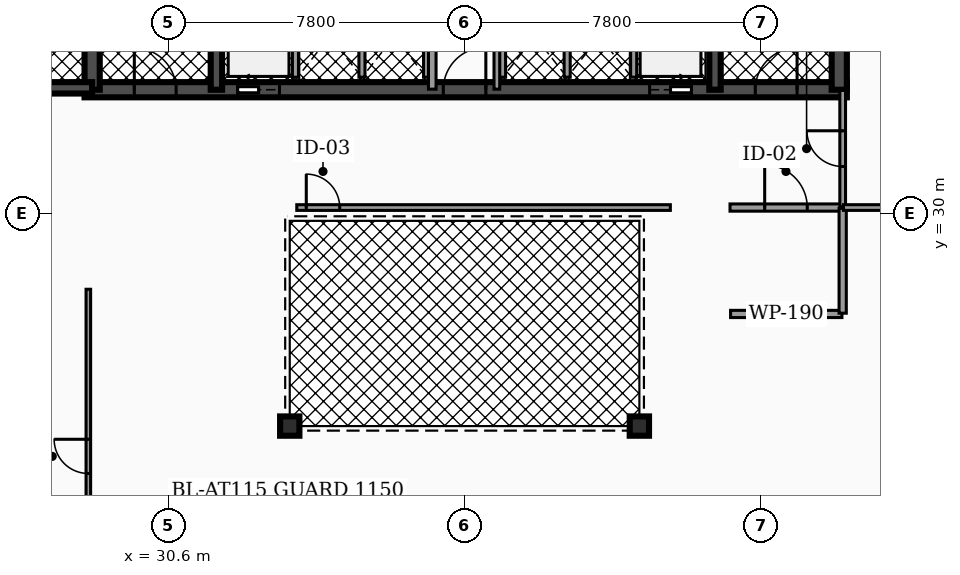
"""IFC4 building model, lengths in metres.
Left out: names, types, materials, properties, quantities, classifications, styles, units other than length and angle.
Written with IfcOpenShell. Run it as: python <this file> out.ifc"""

import sys

from ifc_helpers import new_model, si_unit, direction, frame, frame_2d, origin, origin_2d, place, context, subcontext, project, spatial, rectangle, hollow_circle, extrude, element, fill, save


model = new_model("IFC4")
c1 = context("Model", 3, precision=1e-05, world=origin(), true_north=direction((0.0, 1.0)))
c2 = subcontext(c1, "Body", "Model", "MODEL_VIEW")
j1 = project(units=[si_unit("LENGTHUNIT", "METRE"), si_unit("PLANEANGLEUNIT", "RADIAN")], contexts=[c1])
p1 = place(None, origin())
s1 = spatial("IfcSite", under=j1, at=p1, CompositionType="ELEMENT")
p2 = place(p1, origin())
s2 = spatial("IfcBuilding", under=s1, at=p2, CompositionType="ELEMENT")
p3 = place(p2, frame((0.0, 0.0, 27.54)))
s3 = spatial("IfcBuildingStorey", under=s2, at=p3, CompositionType="ELEMENT", Elevation=27.54)
p4 = place(p3, frame((28.4, 33.25, 0.0), z_axis=(0.0, 0.0, 1.0), x_axis=(1.0, 0.0, 0.0)))
e1 = element("IfcWall", 1, at=p4, inside=s3, PredefinedType="SHEAR", context=c2, shape_type="SweptSolid", body=[
    extrude(rectangle(XDim=20.06, YDim=0.4, at=frame_2d((10.03, 0.0))), origin(), (0.0, 0.0, 1.0), 3.82),
])
p5 = place(p4, frame((4.03, 0.0, 0.0)))
e2 = element("IfcOpeningElement", 2, at=p5, cuts=e1, PredefinedType="OPENING", context=c2, shape_type="SweptSolid", body=[
    extrude(rectangle(XDim=1.1, YDim=2.15, at=frame_2d((0.55, 1.075))), frame((0.0, 0.21, 0.0), z_axis=(0.0, -1.0, 0.0), x_axis=(1.0, 0.0, 0.0)), (0.0, 0.0, 1.0), 0.42),
])
p6 = place(p4, frame((14.87, 0.0, 0.0)))
e3 = element("IfcOpeningElement", 3, at=p6, cuts=e1, PredefinedType="OPENING", context=c2, shape_type="SweptSolid", body=[
    extrude(rectangle(XDim=1.1, YDim=2.15, at=frame_2d((0.55, 1.075))), frame((0.0, 0.21, 0.0), z_axis=(0.0, -1.0, 0.0), x_axis=(1.0, 0.0, 0.0)), (0.0, 0.0, 1.0), 0.42),
])
p7 = place(p4, frame((1.31, 0.0, 0.0)))
e4 = element("IfcOpeningElement", 4, at=p7, cuts=e1, PredefinedType="OPENING", context=c2, shape_type="SweptSolid", body=[
    extrude(rectangle(XDim=1.1, YDim=2.2, at=frame_2d((0.55, 1.1))), frame((0.0, 0.21, 0.0), z_axis=(0.0, -1.0, 0.0), x_axis=(1.0, 0.0, 0.0)), (0.0, 0.0, 1.0), 0.42),
])
p8 = place(p4, frame((9.44, 0.0, 0.0)))
e5 = element("IfcOpeningElement", 5, at=p8, cuts=e1, PredefinedType="OPENING", context=c2, shape_type="SweptSolid", body=[
    extrude(rectangle(XDim=1.12, YDim=2.05, at=frame_2d((0.56, 1.025))), frame((0.0, 0.21, 0.0), z_axis=(0.0, -1.0, 0.0), x_axis=(1.0, 0.0, 0.0)), (0.0, 0.0, 1.0), 0.42),
])
p9 = place(p4, frame((17.65, 0.0, 0.0)))
e6 = element("IfcOpeningElement", 6, at=p9, cuts=e1, PredefinedType="OPENING", context=c2, shape_type="SweptSolid", body=[
    extrude(rectangle(XDim=1.1, YDim=2.2, at=frame_2d((0.55, 1.1))), frame((0.0, 0.21, 0.0), z_axis=(0.0, -1.0, 0.0), x_axis=(1.0, 0.0, 0.0)), (0.0, 0.0, 1.0), 0.42),
])
p10 = place(p3, frame((28.6, 33.25, 0.0), z_axis=(0.0, 0.0, 1.0), x_axis=(0.0, 1.0, 0.0)))
e7 = element("IfcWall", 7, at=p10, inside=s3, PredefinedType="SHEAR", context=c2, shape_type="SweptSolid", body=[
    extrude(rectangle(XDim=10.2, YDim=0.4, at=frame_2d((5.1, 0.0))), origin(), (0.0, 0.0, 1.0), 3.82),
])
for number, where, z_axis, x_axis in (
    (8, (31.87, 33.25, 0.0), (0.0, 0.0, 1.0), (0.0, 1.0, 0.0)),
    (9, (44.99, 33.25, 0.0), (0.0, 0.0, 1.0), (0.0, 1.0, 0.0)),
):
    element("IfcWall", number, at=place(p3, frame(where, z_axis=z_axis, x_axis=x_axis)), inside=s3, PredefinedType="SHEAR", context=c2, shape_type="SweptSolid", body=[
        extrude(rectangle(XDim=10.2, YDim=0.3, at=frame_2d((5.1, 0.0))), origin(), (0.0, 0.0, 1.0), 3.82),
    ])
p11 = place(p3, frame((48.26, 33.25, 0.0), z_axis=(0.0, 0.0, 1.0), x_axis=(0.0, 1.0, 0.0)))
e10 = element("IfcWall", 10, at=p11, inside=s3, PredefinedType="SHEAR", context=c2, shape_type="SweptSolid", body=[
    extrude(rectangle(XDim=10.2, YDim=0.4, at=frame_2d((5.1, 0.0))), origin(), (0.0, 0.0, 1.0), 3.82),
])
p12 = place(p3, frame((25.08, 33.3, 0.0), z_axis=(0.0, 0.0, 1.0), x_axis=(1.0, 0.0, 0.0)))
e11 = element("IfcWall", 11, at=p12, inside=s3, PredefinedType="SHEAR", context=c2, shape_type="SweptSolid", body=[
    extrude(rectangle(XDim=3.52, YDim=0.3, at=frame_2d((1.76, 0.0))), origin(), (0.0, 0.0, 1.0), 3.82),
])
p13 = place(p12, frame((1.335, 0.0, 0.0)))
e12 = element("IfcOpeningElement", 12, at=p13, cuts=e11, PredefinedType="OPENING", context=c2, shape_type="SweptSolid", body=[
    extrude(rectangle(XDim=0.95, YDim=2.2, at=frame_2d((0.475, 1.1))), frame((0.0, 0.16, 0.0), z_axis=(0.0, -1.0, 0.0), x_axis=(1.0, 0.0, 0.0)), (0.0, 0.0, 1.0), 0.32),
])
for number, where, z_axis, x_axis in (
    (13, (33.8, 24.4, 0.0), (0.0, 0.0, 1.0), (1.0, 0.0, 0.0)),
    (14, (43.0, 24.4, 0.0), (0.0, 0.0, 1.0), (1.0, 0.0, 0.0)),
):
    element("IfcColumn", number, at=place(p3, frame(where, z_axis=z_axis, x_axis=x_axis)), inside=s3, PredefinedType="COLUMN", context=c2, shape_type="SweptSolid", body=[
        extrude(hollow_circle(Radius=0.254, WallThickness=0.02, at=origin_2d()), origin(), (0.0, 0.0, 1.0), 3.82),
    ])
for number, where, z_axis, x_axis in (
    (15, (33.95, 33.58, 0.0), (0.0, 0.0, 1.0), (0.0, 1.0, 0.0)),
    (16, (42.85, 33.58, 0.0), (0.0, 0.0, 1.0), (0.0, 1.0, 0.0)),
):
    element("IfcWall", number, at=place(p3, frame(where, z_axis=z_axis, x_axis=x_axis)), inside=s3, PredefinedType="SOLIDWALL", context=c2, shape_type="SweptSolid", body=[
        extrude(rectangle(XDim=2.45, YDim=0.16, at=frame_2d((1.225, 0.0))), origin(), (0.0, 0.0, 1.0), 2.792),
    ])
for number, where, z_axis, x_axis in (
    (17, (35.7, 33.58, 0.0), (0.0, 0.0, 1.0), (0.0, 1.0, 0.0)),
    (18, (37.4, 33.58, 0.0), (0.0, 0.0, 1.0), (0.0, 1.0, 0.0)),
    (19, (39.4, 33.58, 0.0), (0.0, 0.0, 1.0), (0.0, 1.0, 0.0)),
    (20, (41.1, 33.58, 0.0), (0.0, 0.0, 1.0), (0.0, 1.0, 0.0)),
):
    element("IfcWall", number, at=place(p3, frame(where, z_axis=z_axis, x_axis=x_axis)), inside=s3, PredefinedType="SOLIDWALL", context=c2, shape_type="SweptSolid", body=[
        extrude(rectangle(XDim=2.25, YDim=0.16, at=frame_2d((1.125, 0.0))), origin(), (0.0, 0.0, 1.0), 2.792),
    ])
p14 = place(p3, frame((37.55, 33.265, 0.0), z_axis=(0.0, 0.0, 1.0), x_axis=(0.0, 1.0, 0.0)))
e21 = element("IfcWall", 21, at=p14, inside=s3, PredefinedType="PARTITIONING", context=c2, shape_type="SweptSolid", body=[
    extrude(rectangle(XDim=4.595, YDim=0.2, at=frame_2d((2.298, 0.0))), origin(), (0.0, 0.0, 1.0), 2.777),
])
p15 = place(p14, frame((3.058, 0.0, 0.0)))
e22 = element("IfcOpeningElement", 22, at=p15, cuts=e21, PredefinedType="OPENING", context=c2, shape_type="SweptSolid", body=[
    extrude(rectangle(XDim=0.88, YDim=2.05, at=frame_2d((0.44, 1.025))), frame((0.0, 0.11, 0.0), z_axis=(0.0, -1.0, 0.0), x_axis=(1.0, 0.0, 0.0)), (0.0, 0.0, 1.0), 0.22),
])
p16 = place(p3, frame((39.25, 33.265, 0.0), z_axis=(0.0, 0.0, 1.0), x_axis=(0.0, 1.0, 0.0)))
e23 = element("IfcWall", 23, at=p16, inside=s3, PredefinedType="PARTITIONING", context=c2, shape_type="SweptSolid", body=[
    extrude(rectangle(XDim=4.595, YDim=0.15, at=frame_2d((2.298, 0.0))), origin(), (0.0, 0.0, 1.0), 2.777),
])
p17 = place(p16, frame((3.028, 0.0, 0.0)))
e24 = element("IfcOpeningElement", 24, at=p17, cuts=e23, PredefinedType="OPENING", context=c2, shape_type="SweptSolid", body=[
    extrude(rectangle(XDim=0.94, YDim=2.05, at=frame_2d((0.47, 1.025))), frame((0.0, 0.085, 0.0), z_axis=(0.0, -1.0, 0.0), x_axis=(1.0, 0.0, 0.0)), (0.0, 0.0, 1.0), 0.17),
])
p18 = place(p3, frame((45.385, 30.15, 0.0), z_axis=(0.0, 0.0, 1.0), x_axis=(1.0, 0.0, 0.0)))
e25 = element("IfcWall", 25, at=p18, inside=s3, PredefinedType="PARTITIONING", context=c2, shape_type="SweptSolid", body=[
    extrude(rectangle(XDim=2.945, YDim=0.19, at=frame_2d((1.473, 0.0))), origin(), (0.0, 0.0, 1.0), 2.777),
])
p19 = place(p18, frame((0.913, 0.0, 0.0)))
e26 = element("IfcOpeningElement", 26, at=p19, cuts=e25, PredefinedType="OPENING", context=c2, shape_type="SweptSolid", body=[
    extrude(rectangle(XDim=1.12, YDim=2.05, at=frame_2d((0.56, 1.025))), frame((0.0, 0.105, 0.0), z_axis=(0.0, -1.0, 0.0), x_axis=(1.0, 0.0, 0.0)), (0.0, 0.0, 1.0), 0.21),
])
p20 = place(p3, frame((48.35, 30.17, 0.0), z_axis=(0.0, 0.0, 1.0), x_axis=(0.0, 1.0, 0.0)))
e27 = element("IfcWall", 27, at=p20, inside=s3, PredefinedType="PARTITIONING", context=c2, shape_type="SweptSolid", body=[
    extrude(rectangle(XDim=3.06, YDim=0.15, at=frame_2d((1.53, 0.0))), origin(), (0.0, 0.0, 1.0), 2.777),
])
p21 = place(p20, frame((1.06, 0.0, 0.0)))
e28 = element("IfcOpeningElement", 28, at=p21, cuts=e27, PredefinedType="OPENING", context=c2, shape_type="SweptSolid", body=[
    extrude(rectangle(XDim=0.94, YDim=2.05, at=frame_2d((0.47, 1.025))), frame((0.0, 0.085, 0.0), z_axis=(0.0, -1.0, 0.0), x_axis=(1.0, 0.0, 0.0)), (0.0, 0.0, 1.0), 0.17),
])
p22 = place(p3, frame((33.985, 30.15, 0.0), z_axis=(0.0, 0.0, 1.0), x_axis=(1.0, 0.0, 0.0)))
e29 = element("IfcWall", 29, at=p22, inside=s3, PredefinedType="PARTITIONING", context=c2, shape_type="SweptSolid", body=[
    extrude(rectangle(XDim=9.83, YDim=0.15, at=frame_2d((4.915, 0.0))), origin(), (0.0, 0.0, 1.0), 2.777),
])
p23 = place(p22, frame((0.25, 0.0, 0.0)))
e30 = element("IfcOpeningElement", 30, at=p23, cuts=e29, PredefinedType="OPENING", context=c2, shape_type="SweptSolid", body=[
    extrude(rectangle(XDim=0.88, YDim=2.05, at=frame_2d((0.44, 1.025))), frame((0.0, 0.085, 0.0), z_axis=(0.0, -1.0, 0.0), x_axis=(1.0, 0.0, 0.0)), (0.0, 0.0, 1.0), 0.17),
])
p24 = place(p3, frame((45.4, 27.35, 0.0), z_axis=(0.0, 0.0, 1.0), x_axis=(1.0, 0.0, 0.0)))
e31 = element("IfcWall", 31, at=p24, inside=s3, PredefinedType="PARTITIONING", context=c2, shape_type="SweptSolid", body=[
    extrude(rectangle(XDim=2.93, YDim=0.19, at=frame_2d((1.465, 0.0))), origin(), (0.0, 0.0, 1.0), 2.777),
])
p25 = place(p3, frame((48.35, 27.37, 0.0), z_axis=(0.0, 0.0, 1.0), x_axis=(0.0, 1.0, 0.0)))
e32 = element("IfcWall", 32, at=p25, inside=s3, PredefinedType="PARTITIONING", context=c2, shape_type="SweptSolid", body=[
    extrude(rectangle(XDim=2.76, YDim=0.19, at=frame_2d((1.38, 0.0))), origin(), (0.0, 0.0, 1.0), 2.777),
])
p26 = place(p3, frame((48.37, 30.15, 0.0), z_axis=(0.0, 0.0, 1.0), x_axis=(1.0, 0.0, 0.0)))
e33 = element("IfcWall", 33, at=p26, inside=s3, PredefinedType="PARTITIONING", context=c2, shape_type="SweptSolid", body=[
    extrude(rectangle(XDim=2.06, YDim=0.15, at=frame_2d((1.03, 0.0))), origin(), (0.0, 0.0, 1.0), 2.777),
])
p27 = place(p3, frame((28.5, 19.205, 0.0), z_axis=(0.0, 0.0, 1.0), x_axis=(0.0, 1.0, 0.0)))
e34 = element("IfcWall", 34, at=p27, inside=s3, PredefinedType="PARTITIONING", context=c2, shape_type="SweptSolid", body=[
    extrude(rectangle(XDim=8.795, YDim=0.12, at=frame_2d((4.397, 0.0))), origin(), (0.0, 0.0, 1.0), 2.777),
])
p28 = place(p27, frame((3.947, 0.0, 0.0)))
e35 = element("IfcOpeningElement", 35, at=p28, cuts=e34, PredefinedType="OPENING", context=c2, shape_type="SweptSolid", body=[
    extrude(rectangle(XDim=0.9, YDim=2.05, at=frame_2d((0.45, 1.025))), frame((0.0, 0.07, 0.0), z_axis=(0.0, -1.0, 0.0), x_axis=(1.0, 0.0, 0.0)), (0.0, 0.0, 1.0), 0.14),
])
p29 = place(p5, origin())
e36 = element("IfcDoor", 36, at=p29, inside=s3, OperationType="SLIDING_TO_LEFT", PredefinedType="DOOR", context=c2, shape_type="SweptSolid", body=[
    extrude(rectangle(XDim=1.1, YDim=2.15, at=frame_2d((0.55, 1.075))), frame((0.0, 0.025, 0.0), z_axis=(0.0, -1.0, 0.0), x_axis=(1.0, 0.0, 0.0)), (0.0, 0.0, 1.0), 0.05),
])
fill(e2, e36)
p30 = place(p6, origin())
e37 = element("IfcDoor", 37, at=p30, inside=s3, OperationType="SLIDING_TO_RIGHT", PredefinedType="DOOR", context=c2, shape_type="SweptSolid", body=[
    extrude(rectangle(XDim=1.1, YDim=2.15, at=frame_2d((0.55, 1.075))), frame((0.0, 0.025, 0.0), z_axis=(0.0, -1.0, 0.0), x_axis=(1.0, 0.0, 0.0)), (0.0, 0.0, 1.0), 0.05),
])
fill(e3, e37)
p31 = place(p7, origin())
e38 = element("IfcDoor", 38, at=p31, inside=s3, OperationType="SINGLE_SWING_LEFT", PredefinedType="DOOR", context=c2, shape_type="SweptSolid", body=[
    extrude(rectangle(XDim=1.1, YDim=2.2, at=frame_2d((0.55, 1.1))), frame((0.0, 0.025, 0.0), z_axis=(0.0, -1.0, 0.0), x_axis=(1.0, 0.0, 0.0)), (0.0, 0.0, 1.0), 0.05),
])
fill(e4, e38)
p32 = place(p8, origin())
e39 = element("IfcDoor", 39, at=p32, inside=s3, OperationType="SINGLE_SWING_RIGHT", PredefinedType="DOOR", context=c2, shape_type="SweptSolid", body=[
    extrude(rectangle(XDim=1.12, YDim=2.05, at=frame_2d((0.56, 1.025))), frame((0.0, 0.025, 0.0), z_axis=(0.0, -1.0, 0.0), x_axis=(1.0, 0.0, 0.0)), (0.0, 0.0, 1.0), 0.05),
])
fill(e5, e39)
p33 = place(p9, origin())
e40 = element("IfcDoor", 40, at=p33, inside=s3, OperationType="SINGLE_SWING_RIGHT", PredefinedType="DOOR", context=c2, shape_type="SweptSolid", body=[
    extrude(rectangle(XDim=1.1, YDim=2.2, at=frame_2d((0.55, 1.1))), frame((0.0, 0.025, 0.0), z_axis=(0.0, -1.0, 0.0), x_axis=(1.0, 0.0, 0.0)), (0.0, 0.0, 1.0), 0.05),
])
fill(e6, e40)
p34 = place(p19, origin())
e41 = element("IfcDoor", 41, at=p34, inside=s3, OperationType="SINGLE_SWING_LEFT", PredefinedType="DOOR", context=c2, shape_type="SweptSolid", body=[
    extrude(rectangle(XDim=1.12, YDim=2.05, at=frame_2d((0.56, 1.025))), frame((0.0, 0.025, 0.0), z_axis=(0.0, -1.0, 0.0), x_axis=(1.0, 0.0, 0.0)), (0.0, 0.0, 1.0), 0.05),
])
fill(e26, e41)
p35 = place(p21, origin())
e42 = element("IfcDoor", 42, at=p35, inside=s3, OperationType="SINGLE_SWING_RIGHT", PredefinedType="DOOR", context=c2, shape_type="SweptSolid", body=[
    extrude(rectangle(XDim=0.94, YDim=2.05, at=frame_2d((0.47, 1.025))), frame((0.0, 0.025, 0.0), z_axis=(0.0, -1.0, 0.0), x_axis=(1.0, 0.0, 0.0)), (0.0, 0.0, 1.0), 0.05),
])
fill(e28, e42)
p36 = place(p23, origin())
e43 = element("IfcDoor", 43, at=p36, inside=s3, OperationType="SINGLE_SWING_LEFT", PredefinedType="DOOR", context=c2, shape_type="SweptSolid", body=[
    extrude(rectangle(XDim=0.88, YDim=2.05, at=frame_2d((0.44, 1.025))), frame((0.0, 0.025, 0.0), z_axis=(0.0, -1.0, 0.0), x_axis=(1.0, 0.0, 0.0)), (0.0, 0.0, 1.0), 0.05),
])
fill(e30, e43)
p37 = place(p28, origin())
e44 = element("IfcDoor", 44, at=p37, inside=s3, OperationType="SINGLE_SWING_RIGHT", PredefinedType="DOOR", context=c2, shape_type="SweptSolid", body=[
    extrude(rectangle(XDim=0.9, YDim=2.05, at=frame_2d((0.45, 1.025))), frame((0.0, 0.025, 0.0), z_axis=(0.0, -1.0, 0.0), x_axis=(1.0, 0.0, 0.0)), (0.0, 0.0, 1.0), 0.05),
])
fill(e35, e44)
save(model, sys.argv[1])
